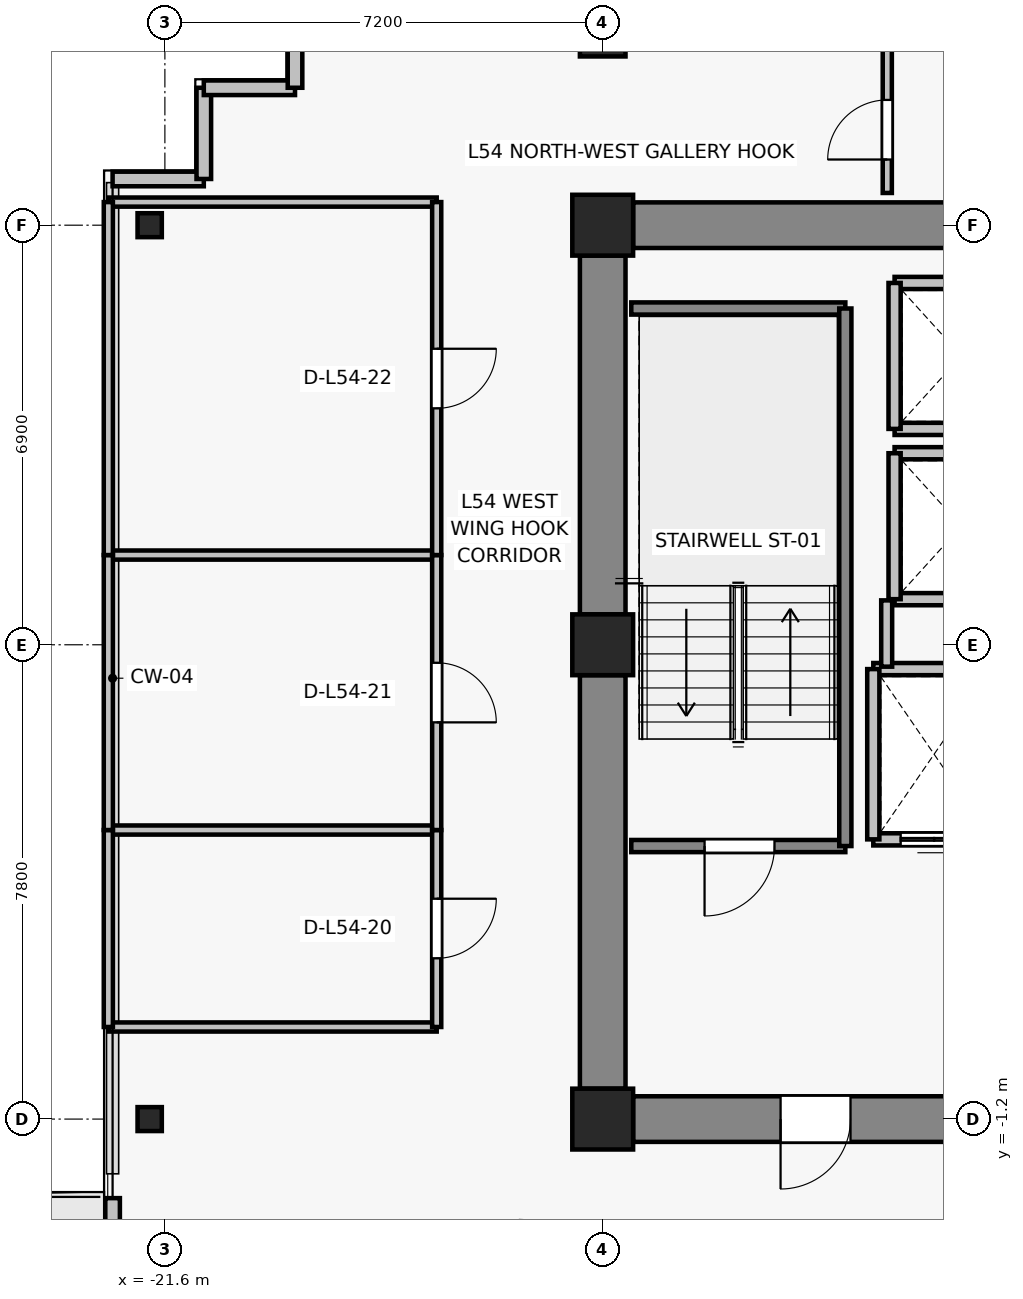
"""IFC4 building model, lengths in metres.
Left out: names, types, materials, properties, quantities, classifications, styles, units other than length and angle.
Written with IfcOpenShell. Run it as: python <this file> out.ifc"""

import sys

from ifc_helpers import new_model, si_unit, direction, frame, frame_2d, origin, origin_2d, place, context, subcontext, project, spatial, rectangle, i_section, extrude, source, transform, mapped, element, fill, save


model = new_model("IFC4")
c1 = context("Model", 3, precision=1e-05, world=origin(), true_north=direction((0.0, 1.0)))
c2 = subcontext(c1, "Body", "Model", "MODEL_VIEW")
j1 = project(units=[si_unit("LENGTHUNIT", "METRE"), si_unit("PLANEANGLEUNIT", "RADIAN")], contexts=[c1])
p1 = place(None, origin())
s1 = spatial("IfcSite", under=j1, at=p1, CompositionType="ELEMENT")
p2 = place(p1, origin())
s2 = spatial("IfcBuilding", under=s1, at=p2, CompositionType="ELEMENT")
p3 = place(p2, frame((0.0, 0.0, 192.4)))
s3 = spatial("IfcBuildingStorey", under=s2, at=p3, CompositionType="ELEMENT", Elevation=192.4)
for number, where, z_axis, x_axis in (
    (1, (-14.4, -1.2, 0.0), (0.0, 0.0, 1.0), (1.0, 0.0, 0.0)),
    (2, (-14.4, 6.6, 0.0), (0.0, 0.0, 1.0), (1.0, 0.0, 0.0)),
    (3, (-14.4, 13.5, 0.0), (0.0, 0.0, 1.0), (1.0, 0.0, 0.0)),
):
    element("IfcColumn", number, at=place(p3, frame(where, z_axis=z_axis, x_axis=x_axis)), inside=s3, PredefinedType="COLUMN", context=c2, shape_type="SweptSolid", body=[
        extrude(rectangle(XDim=1.0, YDim=1.0, at=origin_2d()), origin(), (0.0, 0.0, 1.0), 3.3),
    ])
p4 = place(p3, frame((-14.4, 16.65, 0.0), z_axis=(0.0, 0.0, 1.0), x_axis=(1.0, 0.0, 0.0)))
e4 = element("IfcColumn", 4, at=p4, inside=s3, PredefinedType="COLUMN", context=c2, shape_type="SweptSolid", body=[
    extrude(rectangle(XDim=0.75, YDim=0.75, at=origin_2d()), origin(), (0.0, 0.0, 1.0), 3.3),
])
for number, where, z_axis, x_axis in (
    (5, (-21.85, -1.2, 0.0), (0.0, 0.0, 1.0), (1.0, 0.0, 0.0)),
    (6, (-21.85, 13.5, 0.0), (0.0, 0.0, 1.0), (1.0, 0.0, 0.0)),
):
    element("IfcColumn", number, at=place(p3, frame(where, z_axis=z_axis, x_axis=x_axis)), inside=s3, PredefinedType="COLUMN", context=c2, shape_type="SweptSolid", body=[
        extrude(i_section(OverallWidth=0.399, OverallDepth=0.394, WebThickness=0.023, FlangeThickness=0.037, FilletRadius=0.015, at=origin_2d()), origin(), (0.0, 0.0, 1.0), 3.3),
    ])
p5 = place(p3, frame((-13.9, 13.5, 0.0), z_axis=(0.0, 0.0, 1.0), x_axis=(1.0, 0.0, 0.0)))
e7 = element("IfcWall", 7, at=p5, inside=s3, PredefinedType="SHEAR", context=c2, shape_type="SweptSolid", body=[
    extrude(rectangle(XDim=6.2, YDim=0.75, at=frame_2d((3.1, 0.0))), origin(), (0.0, 0.0, 1.0), 3.075),
])
p6 = place(p3, frame((-14.4, -0.7, 0.0), z_axis=(0.0, 0.0, 1.0), x_axis=(0.0, 1.0, 0.0)))
e8 = element("IfcWall", 8, at=p6, inside=s3, PredefinedType="SHEAR", context=c2, shape_type="SweptSolid", body=[
    extrude(rectangle(XDim=6.8, YDim=0.75, at=frame_2d((3.4, 0.0))), origin(), (0.0, 0.0, 1.0), 3.075),
])
p7 = place(p3, frame((-14.4, 7.1, 0.0), z_axis=(0.0, 0.0, 1.0), x_axis=(0.0, 1.0, 0.0)))
e9 = element("IfcWall", 9, at=p7, inside=s3, PredefinedType="SHEAR", context=c2, shape_type="SweptSolid", body=[
    extrude(rectangle(XDim=5.9, YDim=0.75, at=frame_2d((2.95, 0.0))), origin(), (0.0, 0.0, 1.0), 3.075),
])
p8 = place(p3, frame((-7.7, -1.2, 0.0), z_axis=(0.0, 0.0, 1.0), x_axis=(-1.0, 0.0, 0.0)))
e10 = element("IfcWall", 10, at=p8, inside=s3, PredefinedType="SHEAR", context=c2, shape_type="SweptSolid", body=[
    extrude(rectangle(XDim=6.2, YDim=0.75, at=frame_2d((3.1, 0.0))), origin(), (0.0, 0.0, 1.0), 3.075),
])
p9 = place(p8, frame((2.625, 0.0, 0.0)))
e11 = element("IfcOpeningElement", 11, at=p9, cuts=e10, PredefinedType="OPENING", context=c2, shape_type="SweptSolid", body=[
    extrude(rectangle(XDim=1.15, YDim=2.15, at=frame_2d((0.575, 1.075))), frame((0.0, 0.385, 0.0), z_axis=(0.0, -1.0, 0.0), x_axis=(1.0, 0.0, 0.0)), (0.0, 0.0, 1.0), 0.77),
])
p10 = place(p3, frame((-22.46, -8.3, 0.0), z_axis=(0.0, 0.0, 1.0), x_axis=(0.0, 1.0, 0.0)))
e12 = element("IfcWall", 12, at=p10, inside=s3, PredefinedType="SOLIDWALL", context=c2, shape_type="SweptSolid", body=[
    extrude(rectangle(XDim=5.8, YDim=0.24, at=frame_2d((2.9, 0.0))), origin(), (0.0, 0.0, 1.0), 3.075),
])
p11 = place(p10, frame((1.392, 0.0, 0.0)))
e13 = element("IfcOpeningElement", 13, at=p11, cuts=e12, PredefinedType="OPENING", context=c2, shape_type="SweptSolid", body=[
    extrude(rectangle(XDim=1.0, YDim=2.2, at=frame_2d((0.5, 1.1))), frame((0.0, 0.13, 0.0), z_axis=(0.0, -1.0, 0.0), x_axis=(1.0, 0.0, 0.0)), (0.0, 0.0, 1.0), 0.26),
])
p12 = place(p10, frame((2.7, 0.0, 0.85)))
e14 = element("IfcOpeningElement", 14, at=p12, cuts=e12, PredefinedType="OPENING", context=c2, shape_type="SweptSolid", body=[
    extrude(rectangle(XDim=1.5, YDim=1.6, at=frame_2d((0.75, 0.8))), frame((0.0, 0.13, 0.0), z_axis=(0.0, -1.0, 0.0), x_axis=(1.0, 0.0, 0.0)), (0.0, 0.0, 1.0), 0.26),
])
for number, where, z_axis, x_axis in (
    (15, (-20.96, 14.26, 0.0), (0.0, 0.0, 1.0), (-1.0, 0.0, 0.0)),
    (16, (-20.96, 15.76, 0.0), (0.0, 0.0, 1.0), (0.0, -1.0, 0.0)),
    (17, (-19.46, 15.76, 0.0), (0.0, 0.0, 1.0), (-1.0, 0.0, 0.0)),
    (18, (-19.46, 17.26, 0.0), (0.0, 0.0, 1.0), (0.0, -1.0, 0.0)),
):
    element("IfcWall", number, at=place(p3, frame(where, z_axis=z_axis, x_axis=x_axis)), inside=s3, PredefinedType="SOLIDWALL", context=c2, shape_type="SweptSolid", body=[
        extrude(rectangle(XDim=1.5, YDim=0.24, at=frame_2d((0.75, 0.0))), origin(), (0.0, 0.0, 1.0), 3.075),
    ])
p13 = place(p3, frame((-7.95, 3.4, 0.0), z_axis=(0.0, 0.0, 1.0), x_axis=(-1.0, 0.0, 0.0)))
e19 = element("IfcWall", 19, at=p13, inside=s3, PredefinedType="SOLIDWALL", context=c2, shape_type="SweptSolid", body=[
    extrude(rectangle(XDim=2.0, YDim=0.2, at=frame_2d((1.0, 0.0))), origin(), (0.0, 0.0, 1.0), 3.075),
])
p14 = place(p13, frame((0.45, 0.0, 0.0)))
e20 = element("IfcOpeningElement", 20, at=p14, cuts=e19, PredefinedType="OPENING", context=c2, shape_type="SweptSolid", body=[
    extrude(rectangle(XDim=1.1, YDim=2.2, at=frame_2d((0.55, 1.1))), frame((0.0, 0.11, 0.0), z_axis=(0.0, -1.0, 0.0), x_axis=(1.0, 0.0, 0.0)), (0.0, 0.0, 1.0), 0.22),
])
p15 = place(p3, frame((-9.95, 6.2, 0.0), z_axis=(0.0, 0.0, 1.0), x_axis=(1.0, 0.0, 0.0)))
e21 = element("IfcWall", 21, at=p15, inside=s3, PredefinedType="SOLIDWALL", context=c2, shape_type="SweptSolid", body=[
    extrude(rectangle(XDim=2.0, YDim=0.2, at=frame_2d((1.0, 0.0))), origin(), (0.0, 0.0, 1.0), 3.075),
])
p16 = place(p3, frame((-9.95, 3.4, 0.0), z_axis=(0.0, 0.0, 1.0), x_axis=(0.0, 1.0, 0.0)))
e22 = element("IfcWall", 22, at=p16, inside=s3, PredefinedType="SOLIDWALL", context=c2, shape_type="SweptSolid", body=[
    extrude(rectangle(XDim=2.8, YDim=0.2, at=frame_2d((1.4, 0.0))), origin(), (0.0, 0.0, 1.0), 3.075),
])
for number, where, z_axis, x_axis in (
    (23, (-7.4, 7.35, 0.0), (0.0, 0.0, 1.0), (-1.0, 0.0, 0.0)),
    (24, (-9.6, 9.75, 0.0), (0.0, 0.0, 1.0), (1.0, 0.0, 0.0)),
):
    element("IfcWall", number, at=place(p3, frame(where, z_axis=z_axis, x_axis=x_axis)), inside=s3, PredefinedType="SOLIDWALL", context=c2, shape_type="SweptSolid", body=[
        extrude(rectangle(XDim=2.2, YDim=0.2, at=frame_2d((1.1, 0.0))), origin(), (0.0, 0.0, 1.0), 2.565),
    ])
p17 = place(p3, frame((-9.6, 7.35, 0.0), z_axis=(0.0, 0.0, 1.0), x_axis=(0.0, 1.0, 0.0)))
e25 = element("IfcWall", 25, at=p17, inside=s3, PredefinedType="SOLIDWALL", context=c2, shape_type="SweptSolid", body=[
    extrude(rectangle(XDim=2.4, YDim=0.2, at=frame_2d((1.2, 0.0))), origin(), (0.0, 0.0, 1.0), 3.075),
])
for number, where, z_axis, x_axis in (
    (26, (-7.4, 10.15, 0.0), (0.0, 0.0, 1.0), (-1.0, 0.0, 0.0)),
    (27, (-9.6, 12.55, 0.0), (0.0, 0.0, 1.0), (1.0, 0.0, 0.0)),
):
    element("IfcWall", number, at=place(p3, frame(where, z_axis=z_axis, x_axis=x_axis)), inside=s3, PredefinedType="SOLIDWALL", context=c2, shape_type="SweptSolid", body=[
        extrude(rectangle(XDim=2.2, YDim=0.2, at=frame_2d((1.1, 0.0))), origin(), (0.0, 0.0, 1.0), 2.565),
    ])
p18 = place(p3, frame((-9.6, 10.15, 0.0), z_axis=(0.0, 0.0, 1.0), x_axis=(0.0, 1.0, 0.0)))
e28 = element("IfcWall", 28, at=p18, inside=s3, PredefinedType="SOLIDWALL", context=c2, shape_type="SweptSolid", body=[
    extrude(rectangle(XDim=2.4, YDim=0.2, at=frame_2d((1.2, 0.0))), origin(), (0.0, 0.0, 1.0), 3.075),
])
p19 = place(p3, frame((-10.41, 3.29, 0.0), z_axis=(0.0, 0.0, 1.0), x_axis=(-1.0, 0.0, 0.0)))
e29 = element("IfcWall", 29, at=p19, inside=s3, PredefinedType="SOLIDWALL", context=c2, shape_type="SweptSolid", body=[
    extrude(rectangle(XDim=3.52, YDim=0.2, at=frame_2d((1.76, 0.0))), origin(), (0.0, 0.0, 1.0), 3.075),
])
p20 = place(p19, frame((1.165, 0.0, 0.0)))
e30 = element("IfcOpeningElement", 30, at=p20, cuts=e29, PredefinedType="OPENING", context=c2, shape_type="SweptSolid", body=[
    extrude(rectangle(XDim=1.15, YDim=2.15, at=frame_2d((0.575, 1.075))), frame((0.0, 0.11, 0.0), z_axis=(0.0, -1.0, 0.0), x_axis=(1.0, 0.0, 0.0)), (0.0, 0.0, 1.0), 0.22),
])
p21 = place(p3, frame((-13.93, 12.13, 0.0), z_axis=(0.0, 0.0, 1.0), x_axis=(1.0, 0.0, 0.0)))
e31 = element("IfcWall", 31, at=p21, inside=s3, PredefinedType="SOLIDWALL", context=c2, shape_type="SweptSolid", body=[
    extrude(rectangle(XDim=3.52, YDim=0.2, at=frame_2d((1.76, 0.0))), origin(), (0.0, 0.0, 1.0), 3.075),
])
p22 = place(p3, frame((-10.41, 12.13, 0.0), z_axis=(0.0, 0.0, 1.0), x_axis=(0.0, -1.0, 0.0)))
e32 = element("IfcWall", 32, at=p22, inside=s3, PredefinedType="SOLIDWALL", context=c2, shape_type="SweptSolid", body=[
    extrude(rectangle(XDim=8.84, YDim=0.2, at=frame_2d((4.42, 0.0))), origin(), (0.0, 0.0, 1.0), 3.075),
])
p23 = place(p3, frame((-9.73, 6.24, 0.0), z_axis=(0.0, 0.0, 1.0), x_axis=(0.0, 1.0, 0.0)))
e33 = element("IfcWall", 33, at=p23, inside=s3, PredefinedType="PARTITIONING", context=c2, shape_type="SweptSolid", body=[
    extrude(rectangle(XDim=1.09, YDim=0.18, at=frame_2d((0.545, 0.0))), origin(), (0.0, 0.0, 1.0), 3.075),
])
for number, where, z_axis, x_axis in (
    (34, (-17.13, 0.314, 0.0), (0.0, 0.0, 1.0), (-1.0, 0.0, 0.0)),
    (35, (-22.53, 3.553, 0.0), (0.0, 0.0, 1.0), (1.0, 0.0, 0.0)),
):
    element("IfcWall", number, at=place(p3, frame(where, z_axis=z_axis, x_axis=x_axis)), inside=s3, PredefinedType="PARTITIONING", context=c2, shape_type="SweptSolid", body=[
        extrude(rectangle(XDim=5.4, YDim=0.15, at=frame_2d((2.7, 0.0))), origin(), (0.0, 0.0, 1.0), 2.565),
    ])
p24 = place(p3, frame((-22.53, 0.314, 0.0), z_axis=(0.0, 0.0, 1.0), x_axis=(0.0, 1.0, 0.0)))
e36 = element("IfcWall", 36, at=p24, inside=s3, PredefinedType="PARTITIONING", context=c2, shape_type="SweptSolid", body=[
    extrude(rectangle(XDim=3.239, YDim=0.15, at=frame_2d((1.62, 0.0))), origin(), (0.0, 0.0, 1.0), 3.075),
])
p25 = place(p3, frame((-17.13, 3.553, 0.0), z_axis=(0.0, 0.0, 1.0), x_axis=(0.0, -1.0, 0.0)))
e37 = element("IfcWall", 37, at=p25, inside=s3, PredefinedType="PARTITIONING", context=c2, shape_type="SweptSolid", body=[
    extrude(rectangle(XDim=3.239, YDim=0.15, at=frame_2d((1.62, 0.0))), origin(), (0.0, 0.0, 1.0), 3.075),
])
p26 = place(p25, frame((1.129, 0.0, 0.0)))
e38 = element("IfcOpeningElement", 38, at=p26, cuts=e37, PredefinedType="OPENING", context=c2, shape_type="SweptSolid", body=[
    extrude(rectangle(XDim=0.98, YDim=2.15, at=frame_2d((0.49, 1.075))), frame((0.0, 0.085, 0.0), z_axis=(0.0, -1.0, 0.0), x_axis=(1.0, 0.0, 0.0)), (0.0, 0.0, 1.0), 0.17),
])
p27 = place(p3, frame((-22.53, 8.075, 0.0), z_axis=(0.0, 0.0, 1.0), x_axis=(1.0, 0.0, 0.0)))
e39 = element("IfcWall", 39, at=p27, inside=s3, PredefinedType="PARTITIONING", context=c2, shape_type="SweptSolid", body=[
    extrude(rectangle(XDim=5.4, YDim=0.15, at=frame_2d((2.7, 0.0))), origin(), (0.0, 0.0, 1.0), 2.565),
])
p28 = place(p3, frame((-22.53, 3.553, 0.0), z_axis=(0.0, 0.0, 1.0), x_axis=(0.0, 1.0, 0.0)))
e40 = element("IfcWall", 40, at=p28, inside=s3, PredefinedType="PARTITIONING", context=c2, shape_type="SweptSolid", body=[
    extrude(rectangle(XDim=4.522, YDim=0.15, at=frame_2d((2.261, 0.0))), origin(), (0.0, 0.0, 1.0), 3.075),
])
p29 = place(p3, frame((-17.13, 8.075, 0.0), z_axis=(0.0, 0.0, 1.0), x_axis=(0.0, -1.0, 0.0)))
e41 = element("IfcWall", 41, at=p29, inside=s3, PredefinedType="PARTITIONING", context=c2, shape_type="SweptSolid", body=[
    extrude(rectangle(XDim=4.522, YDim=0.15, at=frame_2d((2.261, 0.0))), origin(), (0.0, 0.0, 1.0), 3.075),
])
p30 = place(p29, frame((1.771, 0.0, 0.0)))
e42 = element("IfcOpeningElement", 42, at=p30, cuts=e41, PredefinedType="OPENING", context=c2, shape_type="SweptSolid", body=[
    extrude(rectangle(XDim=0.98, YDim=2.15, at=frame_2d((0.49, 1.075))), frame((0.0, 0.085, 0.0), z_axis=(0.0, -1.0, 0.0), x_axis=(1.0, 0.0, 0.0)), (0.0, 0.0, 1.0), 0.17),
])
p31 = place(p3, frame((-22.53, 13.88, 0.0), z_axis=(0.0, 0.0, 1.0), x_axis=(1.0, 0.0, 0.0)))
e43 = element("IfcWall", 43, at=p31, inside=s3, PredefinedType="PARTITIONING", context=c2, shape_type="SweptSolid", body=[
    extrude(rectangle(XDim=5.4, YDim=0.15, at=frame_2d((2.7, 0.0))), origin(), (0.0, 0.0, 1.0), 3.075),
])
p32 = place(p3, frame((-22.53, 8.075, 0.0), z_axis=(0.0, 0.0, 1.0), x_axis=(0.0, 1.0, 0.0)))
e44 = element("IfcWall", 44, at=p32, inside=s3, PredefinedType="PARTITIONING", context=c2, shape_type="SweptSolid", body=[
    extrude(rectangle(XDim=5.805, YDim=0.15, at=frame_2d((2.902, 0.0))), origin(), (0.0, 0.0, 1.0), 3.075),
])
p33 = place(p3, frame((-17.13, 13.88, 0.0), z_axis=(0.0, 0.0, 1.0), x_axis=(0.0, -1.0, 0.0)))
e45 = element("IfcWall", 45, at=p33, inside=s3, PredefinedType="PARTITIONING", context=c2, shape_type="SweptSolid", body=[
    extrude(rectangle(XDim=5.805, YDim=0.15, at=frame_2d((2.902, 0.0))), origin(), (0.0, 0.0, 1.0), 2.565),
])
p34 = place(p33, frame((2.412, 0.0, 0.0)))
e46 = element("IfcOpeningElement", 46, at=p34, cuts=e45, PredefinedType="OPENING", context=c2, shape_type="SweptSolid", body=[
    extrude(rectangle(XDim=0.98, YDim=2.15, at=frame_2d((0.49, 1.075))), frame((0.0, 0.085, 0.0), z_axis=(0.0, -1.0, 0.0), x_axis=(1.0, 0.0, 0.0)), (0.0, 0.0, 1.0), 0.17),
])
p35 = place(p3, frame((-9.72, 14.03, 0.0), z_axis=(0.0, 0.0, 1.0), x_axis=(0.0, 1.0, 0.0)))
e47 = element("IfcWall", 47, at=p35, inside=s3, PredefinedType="PARTITIONING", context=c2, shape_type="SweptSolid", body=[
    extrude(rectangle(XDim=3.3, YDim=0.15, at=frame_2d((1.65, 0.0))), origin(), (0.0, 0.0, 1.0), 2.565),
])
p36 = place(p35, frame((0.55, 0.0, 0.0)))
e48 = element("IfcOpeningElement", 48, at=p36, cuts=e47, PredefinedType="OPENING", context=c2, shape_type="SweptSolid", body=[
    extrude(rectangle(XDim=0.98, YDim=2.15, at=frame_2d((0.49, 1.075))), frame((0.0, 0.085, 0.0), z_axis=(0.0, -1.0, 0.0), x_axis=(1.0, 0.0, 0.0)), (0.0, 0.0, 1.0), 0.17),
])
m1 = source(origin(), c2, "Body", "SweptSolid", [
    extrude(rectangle(XDim=1.1, YDim=2.2, at=frame_2d((0.55, 1.1))), frame((0.0, 0.025, 0.0), z_axis=(0.0, -1.0, 0.0), x_axis=(1.0, 0.0, 0.0)), (0.0, 0.0, 1.0), 0.05),
])
p37 = place(p14, origin())
e49 = element("IfcDoor", 49, at=p37, inside=s3, OperationType="DOUBLE_DOOR_SLIDING", PredefinedType="DOOR", context=c2, shape_type="MappedRepresentation", body=[
    mapped(m1, transform((0.0, 0.0, 0.0), x_axis=(1.0, 0.0, 0.0), y_axis=(0.0, 1.0, 0.0), z_axis=(0.0, 0.0, 1.0), scale=1.0)),
])
fill(e20, e49)
m2 = source(origin(), c2, "Body", "SweptSolid", [
    extrude(rectangle(XDim=1.15, YDim=2.15, at=frame_2d((0.575, 1.075))), frame((0.0, 0.025, 0.0), z_axis=(0.0, -1.0, 0.0), x_axis=(1.0, 0.0, 0.0)), (0.0, 0.0, 1.0), 0.05),
])
p38 = place(p20, origin())
e50 = element("IfcDoor", 50, at=p38, inside=s3, OperationType="SINGLE_SWING_RIGHT", PredefinedType="DOOR", context=c2, shape_type="MappedRepresentation", body=[
    mapped(m2, transform((0.0, 0.0, 0.0), x_axis=(1.0, 0.0, 0.0), y_axis=(0.0, 1.0, 0.0), z_axis=(0.0, 0.0, 1.0), scale=1.0)),
])
fill(e30, e50)
p39 = place(p9, origin())
e51 = element("IfcDoor", 51, at=p39, inside=s3, OperationType="SINGLE_SWING_RIGHT", PredefinedType="DOOR", context=c2, shape_type="MappedRepresentation", body=[
    mapped(m2, transform((0.0, 0.0, 0.0), x_axis=(1.0, 0.0, 0.0), y_axis=(0.0, 1.0, 0.0), z_axis=(0.0, 0.0, 1.0), scale=1.0)),
])
fill(e11, e51)
m3 = source(origin(), c2, "Body", "SweptSolid", [
    extrude(rectangle(XDim=0.98, YDim=2.15, at=frame_2d((0.49, 1.075))), frame((0.0, 0.025, 0.0), z_axis=(0.0, -1.0, 0.0), x_axis=(1.0, 0.0, 0.0)), (0.0, 0.0, 1.0), 0.05),
])
p40 = place(p26, origin())
e52 = element("IfcDoor", 52, at=p40, inside=s3, OperationType="SINGLE_SWING_LEFT", PredefinedType="DOOR", context=c2, shape_type="MappedRepresentation", body=[
    mapped(m3, transform((0.0, 0.0, 0.0), x_axis=(1.0, 0.0, 0.0), y_axis=(0.0, 1.0, 0.0), z_axis=(0.0, 0.0, 1.0), scale=1.0)),
])
fill(e38, e52)
p41 = place(p30, origin())
e53 = element("IfcDoor", 53, at=p41, inside=s3, OperationType="SINGLE_SWING_RIGHT", PredefinedType="DOOR", context=c2, shape_type="MappedRepresentation", body=[
    mapped(m3, transform((0.0, 0.0, 0.0), x_axis=(1.0, 0.0, 0.0), y_axis=(0.0, 1.0, 0.0), z_axis=(0.0, 0.0, 1.0), scale=1.0)),
])
fill(e42, e53)
p42 = place(p34, origin())
e54 = element("IfcDoor", 54, at=p42, inside=s3, OperationType="SINGLE_SWING_LEFT", PredefinedType="DOOR", context=c2, shape_type="MappedRepresentation", body=[
    mapped(m3, transform((0.0, 0.0, 0.0), x_axis=(1.0, 0.0, 0.0), y_axis=(0.0, 1.0, 0.0), z_axis=(0.0, 0.0, 1.0), scale=1.0)),
])
fill(e46, e54)
p43 = place(p36, origin())
e55 = element("IfcDoor", 55, at=p43, inside=s3, OperationType="SINGLE_SWING_LEFT", PredefinedType="DOOR", context=c2, shape_type="MappedRepresentation", body=[
    mapped(m3, transform((0.0, 0.0, 0.0), x_axis=(1.0, 0.0, 0.0), y_axis=(0.0, 1.0, 0.0), z_axis=(0.0, 0.0, 1.0), scale=1.0)),
])
fill(e48, e55)
save(model, sys.argv[1])
